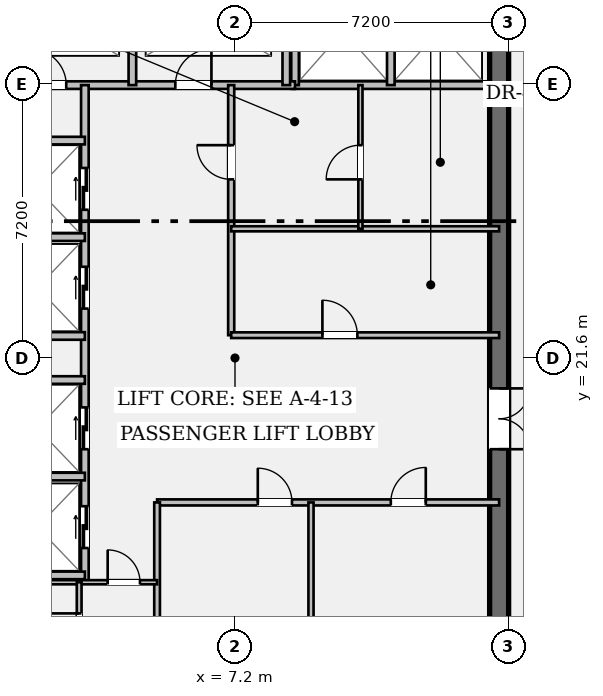
"""IFC4 building model, lengths in metres.
Left out: names, types, materials, properties, quantities, classifications, styles, units other than length and angle.
Written with IfcOpenShell. Run it as: python <this file> out.ifc"""

import sys

from ifc_helpers import new_model, si_unit, direction, frame, frame_2d, origin, place, context, subcontext, project, spatial, rectangle, extrude, element, fill, save


model = new_model("IFC4")
c1 = context("Model", 3, precision=1e-05, world=origin(), true_north=direction((0.0, 1.0)))
c2 = subcontext(c1, "Body", "Model", "MODEL_VIEW")
j1 = project(units=[si_unit("LENGTHUNIT", "METRE"), si_unit("PLANEANGLEUNIT", "RADIAN")], contexts=[c1])
p1 = place(None, origin())
s1 = spatial("IfcSite", under=j1, at=p1, CompositionType="ELEMENT")
p2 = place(p1, origin())
s2 = spatial("IfcBuilding", under=s1, at=p2, CompositionType="ELEMENT")
p3 = place(p2, frame((0.0, 0.0, 258.65)))
s3 = spatial("IfcBuildingStorey", under=s2, at=p3, CompositionType="ELEMENT", Elevation=258.65)
p4 = place(p3, frame((14.15, 35.5, 0.0), z_axis=(0.0, 0.0, 1.0), x_axis=(0.0, -1.0, 0.0)))
e1 = element("IfcWall", 1, at=p4, inside=s3, PredefinedType="SHEAR", context=c2, shape_type="SweptSolid", body=[
    extrude(rectangle(XDim=27.8, YDim=0.5, at=frame_2d((13.9, 0.0))), origin(), (0.0, 0.0, 1.0), 3.24),
])
p5 = place(p4, frame((1.4, 0.0, 0.0)))
e2 = element("IfcOpeningElement", 2, at=p5, cuts=e1, PredefinedType="OPENING", context=c2, shape_type="SweptSolid", body=[
    extrude(rectangle(XDim=1.2, YDim=2.15, at=frame_2d((0.6, 1.075))), frame((0.0, 0.262, 0.0), z_axis=(0.0, -1.0, 0.0), x_axis=(1.0, 0.0, 0.0)), (0.0, 0.0, 1.0), 0.524),
])
p6 = place(p4, frame((25.35, 0.0, 0.0)))
e3 = element("IfcOpeningElement", 3, at=p6, cuts=e1, PredefinedType="OPENING", context=c2, shape_type="SweptSolid", body=[
    extrude(rectangle(XDim=1.2, YDim=2.15, at=frame_2d((0.6, 1.075))), frame((0.0, 0.262, 0.0), z_axis=(0.0, -1.0, 0.0), x_axis=(1.0, 0.0, 0.0)), (0.0, 0.0, 1.0), 0.524),
])
p7 = place(p4, frame((14.7, 0.0, 0.0)))
e4 = element("IfcOpeningElement", 4, at=p7, cuts=e1, PredefinedType="OPENING", context=c2, shape_type="SweptSolid", body=[
    extrude(rectangle(XDim=1.6, YDim=2.2, at=frame_2d((0.8, 1.1))), frame((0.0, 0.262, 0.0), z_axis=(0.0, -1.0, 0.0), x_axis=(1.0, 0.0, 0.0)), (0.0, 0.0, 1.0), 0.524),
])
p8 = place(p3, frame((8.7, 28.78, 0.0), z_axis=(0.0, 0.0, 1.0), x_axis=(1.0, 0.0, 0.0)))
e5 = element("IfcWall", 5, at=p8, inside=s3, PredefinedType="PARTITIONING", context=c2, shape_type="SweptSolid", body=[
    extrude(rectangle(XDim=5.15, YDim=0.2, at=frame_2d((2.575, 0.0))), origin(), (0.0, 0.0, 1.0), 3.24),
])
for number, where, z_axis, x_axis in (
    (6, (8.78, 28.78, 0.0), (0.0, 0.0, 1.0), (0.0, 1.0, 0.0)),
    (7, (11.3, 28.78, 0.0), (0.0, 0.0, 1.0), (0.0, 1.0, 0.0)),
):
    element("IfcWall", number, at=place(p3, frame(where, z_axis=z_axis, x_axis=x_axis)), inside=s3, PredefinedType="PARTITIONING", context=c2, shape_type="SweptSolid", body=[
        extrude(rectangle(XDim=3.1, YDim=0.2, at=frame_2d((1.55, 0.0))), origin(), (0.0, 0.0, 1.0), 3.24),
    ])
p9 = place(p3, frame((0.6, 28.78, 0.0), z_axis=(0.0, 0.0, 1.0), x_axis=(1.0, 0.0, 0.0)))
e8 = element("IfcWall", 8, at=p9, inside=s3, PredefinedType="PARTITIONING", context=c2, shape_type="SweptSolid", body=[
    extrude(rectangle(XDim=8.18, YDim=0.2, at=frame_2d((4.09, 0.0))), origin(), (0.0, 0.0, 1.0), 3.24),
])
p10 = place(p9, frame((1.21, 0.0, 0.0)))
e9 = element("IfcOpeningElement", 9, at=p10, cuts=e8, PredefinedType="OPENING", context=c2, shape_type="SweptSolid", body=[
    extrude(rectangle(XDim=0.95, YDim=2.15, at=frame_2d((0.475, 1.075))), frame((0.0, 0.112, 0.0), z_axis=(0.0, -1.0, 0.0), x_axis=(1.0, 0.0, 0.0)), (0.0, 0.0, 1.0), 0.224),
])
p11 = place(p9, frame((5.03, 0.0, 0.0)))
e10 = element("IfcOpeningElement", 10, at=p11, cuts=e8, PredefinedType="OPENING", context=c2, shape_type="SweptSolid", body=[
    extrude(rectangle(XDim=0.95, YDim=2.15, at=frame_2d((0.475, 1.075))), frame((0.0, 0.112, 0.0), z_axis=(0.0, -1.0, 0.0), x_axis=(1.0, 0.0, 0.0)), (0.0, 0.0, 1.0), 0.224),
])
for number, where, z_axis, x_axis in (
    (11, (4.5, 28.78, 0.0), (0.0, 0.0, 1.0), (0.0, 1.0, 0.0)),
    (12, (8.55, 28.78, 0.0), (0.0, 0.0, 1.0), (0.0, 1.0, 0.0)),
):
    element("IfcWall", number, at=place(p3, frame(where, z_axis=z_axis, x_axis=x_axis)), inside=s3, PredefinedType="PARTITIONING", context=c2, shape_type="SweptSolid", body=[
        extrude(rectangle(XDim=2.94, YDim=0.2, at=frame_2d((1.47, 0.0))), origin(), (0.0, 0.0, 1.0), 3.24),
    ])
p12 = place(p3, frame((3.25, 15.7, 0.0), z_axis=(0.0, 0.0, 1.0), x_axis=(0.0, 1.0, 0.0)))
e13 = element("IfcWall", 13, at=p12, inside=s3, PredefinedType="PARTITIONING", context=c2, shape_type="SweptSolid", body=[
    extrude(rectangle(XDim=13.08, YDim=0.2, at=frame_2d((6.54, 0.0))), origin(), (0.0, 0.0, 1.0), 3.24),
])
p13 = place(p12, frame((0.9, 0.0, 0.0)))
e14 = element("IfcOpeningElement", 14, at=p13, cuts=e13, PredefinedType="OPENING", context=c2, shape_type="SweptSolid", body=[
    extrude(rectangle(XDim=1.1, YDim=2.2, at=frame_2d((0.55, 1.1))), frame((0.0, 0.112, 0.0), z_axis=(0.0, -1.0, 0.0), x_axis=(1.0, 0.0, 0.0)), (0.0, 0.0, 1.0), 0.224),
])
p14 = place(p12, frame((3.5, 0.0, 0.0)))
e15 = element("IfcOpeningElement", 15, at=p14, cuts=e13, PredefinedType="OPENING", context=c2, shape_type="SweptSolid", body=[
    extrude(rectangle(XDim=1.1, YDim=2.2, at=frame_2d((0.55, 1.1))), frame((0.0, 0.112, 0.0), z_axis=(0.0, -1.0, 0.0), x_axis=(1.0, 0.0, 0.0)), (0.0, 0.0, 1.0), 0.224),
])
p15 = place(p12, frame((7.2, 0.0, 0.0)))
e16 = element("IfcOpeningElement", 16, at=p15, cuts=e13, PredefinedType="OPENING", context=c2, shape_type="SweptSolid", body=[
    extrude(rectangle(XDim=1.1, YDim=2.2, at=frame_2d((0.55, 1.1))), frame((0.0, 0.112, 0.0), z_axis=(0.0, -1.0, 0.0), x_axis=(1.0, 0.0, 0.0)), (0.0, 0.0, 1.0), 0.224),
])
p16 = place(p12, frame((9.8, 0.0, 0.0)))
e17 = element("IfcOpeningElement", 17, at=p16, cuts=e13, PredefinedType="OPENING", context=c2, shape_type="SweptSolid", body=[
    extrude(rectangle(XDim=1.1, YDim=2.2, at=frame_2d((0.55, 1.1))), frame((0.0, 0.112, 0.0), z_axis=(0.0, -1.0, 0.0), x_axis=(1.0, 0.0, 0.0)), (0.0, 0.0, 1.0), 0.224),
])
for number, where, z_axis, x_axis in (
    (18, (0.6, 15.88, 0.0), (0.0, 0.0, 1.0), (1.0, 0.0, 0.0)),
    (19, (0.6, 18.48, 0.0), (0.0, 0.0, 1.0), (1.0, 0.0, 0.0)),
    (20, (0.6, 22.18, 0.0), (0.0, 0.0, 1.0), (1.0, 0.0, 0.0)),
    (21, (0.6, 24.78, 0.0), (0.0, 0.0, 1.0), (1.0, 0.0, 0.0)),
    (22, (0.6, 21.02, 0.0), (0.0, 0.0, 1.0), (1.0, 0.0, 0.0)),
    (23, (0.6, 27.32, 0.0), (0.0, 0.0, 1.0), (1.0, 0.0, 0.0)),
):
    element("IfcWall", number, at=place(p3, frame(where, z_axis=z_axis, x_axis=x_axis)), inside=s3, PredefinedType="PARTITIONING", context=c2, shape_type="SweptSolid", body=[
        extrude(rectangle(XDim=2.65, YDim=0.2, at=frame_2d((1.325, 0.0))), origin(), (0.0, 0.0, 1.0), 3.24),
    ])
p17 = place(p3, frame((7.1, 22.2, 0.0), z_axis=(0.0, 0.0, 1.0), x_axis=(0.0, 1.0, 0.0)))
e24 = element("IfcWall", 24, at=p17, inside=s3, PredefinedType="PARTITIONING", context=c2, shape_type="SweptSolid", body=[
    extrude(rectangle(XDim=6.58, YDim=0.16, at=frame_2d((3.29, 0.0))), origin(), (0.0, 0.0, 1.0), 3.24),
])
p18 = place(p17, frame((4.1, 0.0, 0.0)))
e25 = element("IfcOpeningElement", 25, at=p18, cuts=e24, PredefinedType="OPENING", context=c2, shape_type="SweptSolid", body=[
    extrude(rectangle(XDim=0.9, YDim=2.15, at=frame_2d((0.45, 1.075))), frame((0.0, 0.092, 0.0), z_axis=(0.0, -1.0, 0.0), x_axis=(1.0, 0.0, 0.0)), (0.0, 0.0, 1.0), 0.184),
])
p19 = place(p3, frame((7.1, 22.2, 0.0), z_axis=(0.0, 0.0, 1.0), x_axis=(1.0, 0.0, 0.0)))
e26 = element("IfcWall", 26, at=p19, inside=s3, PredefinedType="PARTITIONING", context=c2, shape_type="SweptSolid", body=[
    extrude(rectangle(XDim=7.05, YDim=0.15, at=frame_2d((3.525, 0.0))), origin(), (0.0, 0.0, 1.0), 3.24),
])
p20 = place(p19, frame((2.4, 0.0, 0.0)))
e27 = element("IfcOpeningElement", 27, at=p20, cuts=e26, PredefinedType="OPENING", context=c2, shape_type="SweptSolid", body=[
    extrude(rectangle(XDim=0.92, YDim=2.15, at=frame_2d((0.46, 1.075))), frame((0.0, 0.087, 0.0), z_axis=(0.0, -1.0, 0.0), x_axis=(1.0, 0.0, 0.0)), (0.0, 0.0, 1.0), 0.174),
])
p21 = place(p3, frame((7.1, 25.0, 0.0), z_axis=(0.0, 0.0, 1.0), x_axis=(1.0, 0.0, 0.0)))
e28 = element("IfcWall", 28, at=p21, inside=s3, PredefinedType="PARTITIONING", context=c2, shape_type="SweptSolid", body=[
    extrude(rectangle(XDim=7.05, YDim=0.135, at=frame_2d((3.525, 0.0))), origin(), (0.0, 0.0, 1.0), 3.24),
])
p22 = place(p3, frame((10.5, 25.0, 0.0), z_axis=(0.0, 0.0, 1.0), x_axis=(0.0, 1.0, 0.0)))
e29 = element("IfcWall", 29, at=p22, inside=s3, PredefinedType="PARTITIONING", context=c2, shape_type="SweptSolid", body=[
    extrude(rectangle(XDim=3.78, YDim=0.11, at=frame_2d((1.89, 0.0))), origin(), (0.0, 0.0, 1.0), 3.24),
])
p23 = place(p22, frame((1.3, 0.0, 0.0)))
e30 = element("IfcOpeningElement", 30, at=p23, cuts=e29, PredefinedType="OPENING", context=c2, shape_type="SweptSolid", body=[
    extrude(rectangle(XDim=0.9, YDim=2.15, at=frame_2d((0.45, 1.075))), frame((0.0, 0.067, 0.0), z_axis=(0.0, -1.0, 0.0), x_axis=(1.0, 0.0, 0.0)), (0.0, 0.0, 1.0), 0.134),
])
p24 = place(p3, frame((5.15, 17.8, 0.0), z_axis=(0.0, 0.0, 1.0), x_axis=(1.0, 0.0, 0.0)))
e31 = element("IfcWall", 31, at=p24, inside=s3, PredefinedType="PARTITIONING", context=c2, shape_type="SweptSolid", body=[
    extrude(rectangle(XDim=9.0, YDim=0.16, at=frame_2d((4.5, 0.0))), origin(), (0.0, 0.0, 1.0), 3.24),
])
p25 = place(p24, frame((2.65, 0.0, 0.0)))
e32 = element("IfcOpeningElement", 32, at=p25, cuts=e31, PredefinedType="OPENING", context=c2, shape_type="SweptSolid", body=[
    extrude(rectangle(XDim=0.9, YDim=2.15, at=frame_2d((0.45, 1.075))), frame((0.0, 0.092, 0.0), z_axis=(0.0, -1.0, 0.0), x_axis=(1.0, 0.0, 0.0)), (0.0, 0.0, 1.0), 0.184),
])
p26 = place(p24, frame((6.15, 0.0, 0.0)))
e33 = element("IfcOpeningElement", 33, at=p26, cuts=e31, PredefinedType="OPENING", context=c2, shape_type="SweptSolid", body=[
    extrude(rectangle(XDim=0.92, YDim=2.15, at=frame_2d((0.46, 1.075))), frame((0.0, 0.092, 0.0), z_axis=(0.0, -1.0, 0.0), x_axis=(1.0, 0.0, 0.0)), (0.0, 0.0, 1.0), 0.184),
])
p27 = place(p3, frame((5.15, 11.2, 0.0), z_axis=(0.0, 0.0, 1.0), x_axis=(0.0, 1.0, 0.0)))
e34 = element("IfcWall", 34, at=p27, inside=s3, PredefinedType="PARTITIONING", context=c2, shape_type="SweptSolid", body=[
    extrude(rectangle(XDim=6.6, YDim=0.15, at=frame_2d((3.3, 0.0))), origin(), (0.0, 0.0, 1.0), 3.24),
])
p28 = place(p3, frame((9.2, 11.2, 0.0), z_axis=(0.0, 0.0, 1.0), x_axis=(0.0, 1.0, 0.0)))
e35 = element("IfcWall", 35, at=p28, inside=s3, PredefinedType="PARTITIONING", context=c2, shape_type="SweptSolid", body=[
    extrude(rectangle(XDim=6.6, YDim=0.135, at=frame_2d((3.3, 0.0))), origin(), (0.0, 0.0, 1.0), 3.24),
])
p29 = place(p3, frame((0.6, 15.7, 0.0), z_axis=(0.0, 0.0, 1.0), x_axis=(1.0, 0.0, 0.0)))
e36 = element("IfcWall", 36, at=p29, inside=s3, PredefinedType="PARTITIONING", context=c2, shape_type="SweptSolid", body=[
    extrude(rectangle(XDim=4.55, YDim=0.11, at=frame_2d((2.275, 0.0))), origin(), (0.0, 0.0, 1.0), 3.24),
])
p30 = place(p29, frame((3.25, 0.0, 0.0)))
e37 = element("IfcOpeningElement", 37, at=p30, cuts=e36, PredefinedType="OPENING", context=c2, shape_type="SweptSolid", body=[
    extrude(rectangle(XDim=0.85, YDim=2.15, at=frame_2d((0.425, 1.075))), frame((0.0, 0.067, 0.0), z_axis=(0.0, -1.0, 0.0), x_axis=(1.0, 0.0, 0.0)), (0.0, 0.0, 1.0), 0.134),
])
p31 = place(p3, frame((3.1, 11.28, 0.0), z_axis=(0.0, 0.0, 1.0), x_axis=(0.0, 1.0, 0.0)))
e38 = element("IfcWall", 38, at=p31, inside=s3, PredefinedType="PARTITIONING", context=c2, shape_type="SweptSolid", body=[
    extrude(rectangle(XDim=4.42, YDim=0.125, at=frame_2d((2.21, 0.0))), origin(), (0.0, 0.0, 1.0), 3.24),
])
p32 = place(p31, frame((0.65, 0.0, 0.0)))
e39 = element("IfcOpeningElement", 39, at=p32, cuts=e38, PredefinedType="OPENING", context=c2, shape_type="SweptSolid", body=[
    extrude(rectangle(XDim=0.85, YDim=2.15, at=frame_2d((0.425, 1.075))), frame((0.0, 0.074, 0.0), z_axis=(0.0, -1.0, 0.0), x_axis=(1.0, 0.0, 0.0)), (0.0, 0.0, 1.0), 0.149),
])
p33 = place(p31, frame((2.75, 0.0, 0.0)))
e40 = element("IfcOpeningElement", 40, at=p33, cuts=e38, PredefinedType="OPENING", context=c2, shape_type="SweptSolid", body=[
    extrude(rectangle(XDim=0.85, YDim=2.15, at=frame_2d((0.425, 1.075))), frame((0.0, 0.074, 0.0), z_axis=(0.0, -1.0, 0.0), x_axis=(1.0, 0.0, 0.0)), (0.0, 0.0, 1.0), 0.149),
])
p34 = place(p10, origin())
e41 = element("IfcDoor", 41, at=p34, inside=s3, OperationType="SINGLE_SWING_LEFT", PredefinedType="DOOR", context=c2, shape_type="SweptSolid", body=[
    extrude(rectangle(XDim=0.95, YDim=2.15, at=frame_2d((0.475, 1.075))), frame((0.0, 0.025, 0.0), z_axis=(0.0, -1.0, 0.0), x_axis=(1.0, 0.0, 0.0)), (0.0, 0.0, 1.0), 0.05),
])
fill(e9, e41)
p35 = place(p11, origin())
e42 = element("IfcDoor", 42, at=p35, inside=s3, OperationType="SINGLE_SWING_RIGHT", PredefinedType="DOOR", context=c2, shape_type="SweptSolid", body=[
    extrude(rectangle(XDim=0.95, YDim=2.15, at=frame_2d((0.475, 1.075))), frame((0.0, 0.025, 0.0), z_axis=(0.0, -1.0, 0.0), x_axis=(1.0, 0.0, 0.0)), (0.0, 0.0, 1.0), 0.05),
])
fill(e10, e42)
p36 = place(p7, origin())
e43 = element("IfcDoor", 43, at=p36, inside=s3, OperationType="DOUBLE_DOOR_SINGLE_SWING", PredefinedType="DOOR", context=c2, shape_type="SweptSolid", body=[
    extrude(rectangle(XDim=1.6, YDim=2.2, at=frame_2d((0.8, 1.1))), frame((0.0, 0.025, 0.0), z_axis=(0.0, -1.0, 0.0), x_axis=(1.0, 0.0, 0.0)), (0.0, 0.0, 1.0), 0.05),
])
fill(e4, e43)
p37 = place(p13, origin())
e44 = element("IfcDoor", 44, at=p37, inside=s3, OperationType="DOUBLE_DOOR_SLIDING", PredefinedType="DOOR", context=c2, shape_type="SweptSolid", body=[
    extrude(rectangle(XDim=1.1, YDim=2.2, at=frame_2d((0.55, 1.1))), frame((0.0, 0.025, 0.0), z_axis=(0.0, -1.0, 0.0), x_axis=(1.0, 0.0, 0.0)), (0.0, 0.0, 1.0), 0.05),
])
fill(e14, e44)
p38 = place(p14, origin())
e45 = element("IfcDoor", 45, at=p38, inside=s3, OperationType="DOUBLE_DOOR_SLIDING", PredefinedType="DOOR", context=c2, shape_type="SweptSolid", body=[
    extrude(rectangle(XDim=1.1, YDim=2.2, at=frame_2d((0.55, 1.1))), frame((0.0, 0.025, 0.0), z_axis=(0.0, -1.0, 0.0), x_axis=(1.0, 0.0, 0.0)), (0.0, 0.0, 1.0), 0.05),
])
fill(e15, e45)
p39 = place(p15, origin())
e46 = element("IfcDoor", 46, at=p39, inside=s3, OperationType="DOUBLE_DOOR_SLIDING", PredefinedType="DOOR", context=c2, shape_type="SweptSolid", body=[
    extrude(rectangle(XDim=1.1, YDim=2.2, at=frame_2d((0.55, 1.1))), frame((0.0, 0.025, 0.0), z_axis=(0.0, -1.0, 0.0), x_axis=(1.0, 0.0, 0.0)), (0.0, 0.0, 1.0), 0.05),
])
fill(e16, e46)
p40 = place(p16, origin())
e47 = element("IfcDoor", 47, at=p40, inside=s3, OperationType="DOUBLE_DOOR_SLIDING", PredefinedType="DOOR", context=c2, shape_type="SweptSolid", body=[
    extrude(rectangle(XDim=1.1, YDim=2.2, at=frame_2d((0.55, 1.1))), frame((0.0, 0.025, 0.0), z_axis=(0.0, -1.0, 0.0), x_axis=(1.0, 0.0, 0.0)), (0.0, 0.0, 1.0), 0.05),
])
fill(e17, e47)
p41 = place(p20, origin())
e48 = element("IfcDoor", 48, at=p41, inside=s3, OperationType="SINGLE_SWING_LEFT", PredefinedType="DOOR", context=c2, shape_type="SweptSolid", body=[
    extrude(rectangle(XDim=0.92, YDim=2.15, at=frame_2d((0.46, 1.075))), frame((0.0, 0.025, 0.0), z_axis=(0.0, -1.0, 0.0), x_axis=(1.0, 0.0, 0.0)), (0.0, 0.0, 1.0), 0.05),
])
fill(e27, e48)
p42 = place(p18, origin())
e49 = element("IfcDoor", 49, at=p42, inside=s3, OperationType="SINGLE_SWING_RIGHT", PredefinedType="DOOR", context=c2, shape_type="SweptSolid", body=[
    extrude(rectangle(XDim=0.9, YDim=2.15, at=frame_2d((0.45, 1.075))), frame((0.0, 0.025, 0.0), z_axis=(0.0, -1.0, 0.0), x_axis=(1.0, 0.0, 0.0)), (0.0, 0.0, 1.0), 0.05),
])
fill(e25, e49)
p43 = place(p23, origin())
e50 = element("IfcDoor", 50, at=p43, inside=s3, OperationType="SINGLE_SWING_LEFT", PredefinedType="DOOR", context=c2, shape_type="SweptSolid", body=[
    extrude(rectangle(XDim=0.9, YDim=2.15, at=frame_2d((0.45, 1.075))), frame((0.0, 0.025, 0.0), z_axis=(0.0, -1.0, 0.0), x_axis=(1.0, 0.0, 0.0)), (0.0, 0.0, 1.0), 0.05),
])
fill(e30, e50)
p44 = place(p25, origin())
e51 = element("IfcDoor", 51, at=p44, inside=s3, OperationType="SINGLE_SWING_LEFT", PredefinedType="DOOR", context=c2, shape_type="SweptSolid", body=[
    extrude(rectangle(XDim=0.9, YDim=2.15, at=frame_2d((0.45, 1.075))), frame((0.0, 0.025, 0.0), z_axis=(0.0, -1.0, 0.0), x_axis=(1.0, 0.0, 0.0)), (0.0, 0.0, 1.0), 0.05),
])
fill(e32, e51)
p45 = place(p26, origin())
e52 = element("IfcDoor", 52, at=p45, inside=s3, OperationType="SINGLE_SWING_RIGHT", PredefinedType="DOOR", context=c2, shape_type="SweptSolid", body=[
    extrude(rectangle(XDim=0.92, YDim=2.15, at=frame_2d((0.46, 1.075))), frame((0.0, 0.025, 0.0), z_axis=(0.0, -1.0, 0.0), x_axis=(1.0, 0.0, 0.0)), (0.0, 0.0, 1.0), 0.05),
])
fill(e33, e52)
p46 = place(p30, origin())
e53 = element("IfcDoor", 53, at=p46, inside=s3, OperationType="SINGLE_SWING_LEFT", PredefinedType="DOOR", context=c2, shape_type="SweptSolid", body=[
    extrude(rectangle(XDim=0.85, YDim=2.15, at=frame_2d((0.425, 1.075))), frame((0.0, 0.025, 0.0), z_axis=(0.0, -1.0, 0.0), x_axis=(1.0, 0.0, 0.0)), (0.0, 0.0, 1.0), 0.05),
])
fill(e37, e53)
p47 = place(p33, origin())
e54 = element("IfcDoor", 54, at=p47, inside=s3, OperationType="SINGLE_SWING_RIGHT", PredefinedType="DOOR", context=c2, shape_type="SweptSolid", body=[
    extrude(rectangle(XDim=0.85, YDim=2.15, at=frame_2d((0.425, 1.075))), frame((0.0, 0.025, 0.0), z_axis=(0.0, -1.0, 0.0), x_axis=(1.0, 0.0, 0.0)), (0.0, 0.0, 1.0), 0.05),
])
fill(e40, e54)
save(model, sys.argv[1])
